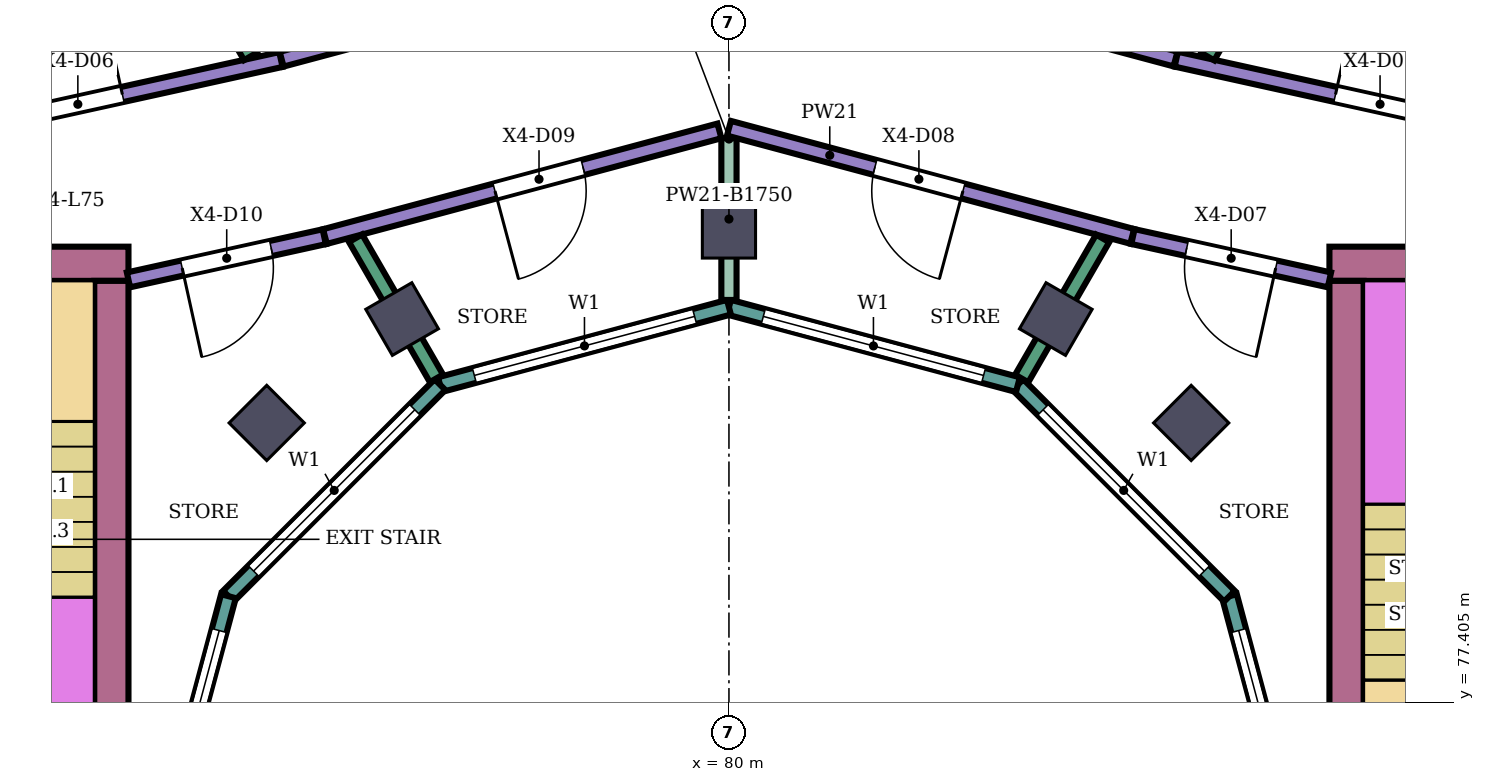
"""IFC4 building model, lengths in metres.
Left out: names, types, materials, properties, quantities, classifications, styles, units other than length and angle.
Written with IfcOpenShell. Run it as: python <this file> out.ifc"""

import sys

from ifc_helpers import new_model, si_unit, direction, frame, frame_2d, origin, origin_2d, place, context, subcontext, project, spatial, rectangle, extrude, element, fill, save


model = new_model("IFC4")
c1 = context("Model", 3, precision=1e-05, world=origin(), true_north=direction((0.0, 1.0)))
c2 = subcontext(c1, "Body", "Model", "MODEL_VIEW")
j1 = project(units=[si_unit("LENGTHUNIT", "METRE"), si_unit("PLANEANGLEUNIT", "RADIAN")], contexts=[c1])
p1 = place(None, origin())
s1 = spatial("IfcSite", under=j1, at=p1, CompositionType="ELEMENT")
p2 = place(p1, origin())
s2 = spatial("IfcBuilding", under=s1, at=p2, CompositionType="ELEMENT")
p3 = place(p2, frame((0.0, 0.0, 328.1)))
s3 = spatial("IfcBuildingStorey", under=s2, at=p3, CompositionType="ELEMENT", Elevation=328.1)
for number, where, z_axis, x_axis in (
    (1, (86.081, 81.081, 0.0), (0.0, 0.0, 1.0), (0.707, 0.707, 0.0)),
    (2, (84.3, 82.448, 0.0), (0.0, 0.0, 1.0), (0.5, 0.866, 0.0)),
    (3, (80.0, 83.6, 0.0), (0.0, 0.0, 1.0), (0.0, 1.0, 0.0)),
    (4, (75.7, 82.448, 0.0), (0.0, 0.0, 1.0), (-0.5, 0.866, 0.0)),
    (5, (73.919, 81.081, 0.0), (0.0, 0.0, 1.0), (-0.707, 0.707, 0.0)),
):
    element("IfcColumn", number, at=place(p3, frame(where, z_axis=z_axis, x_axis=x_axis)), inside=s3, PredefinedType="COLUMN", context=c2, shape_type="SweptSolid", body=[
        extrude(rectangle(XDim=0.7, YDim=0.7, at=origin_2d()), origin(), (0.0, 0.0, 1.0), 5.0),
    ])
p4 = place(p3, frame((87.9, 83.175, 0.0), z_axis=(0.0, 0.0, 1.0), x_axis=(1.0, 0.0, 0.0)))
e6 = element("IfcWall", 6, at=p4, inside=s3, PredefinedType="SHEAR", context=c2, shape_type="SweptSolid", body=[
    extrude(rectangle(XDim=7.05, YDim=0.45, at=frame_2d((3.525, 0.0))), origin(), (0.0, 0.0, 1.0), 4.65),
])
p5 = place(p4, frame((4.2, 0.0, 0.0)))
e7 = element("IfcOpeningElement", 7, at=p5, cuts=e6, PredefinedType="OPENING", context=c2, shape_type="SweptSolid", body=[
    extrude(rectangle(XDim=2.4, YDim=2.4, at=frame_2d((1.2, 1.2))), frame((0.0, 0.235, 0.0), z_axis=(0.0, -1.0, 0.0), x_axis=(1.0, 0.0, 0.0)), (0.0, 0.0, 1.0), 0.47),
])
p6 = place(p3, frame((88.125, 75.0, 0.0), z_axis=(0.0, 0.0, 1.0), x_axis=(0.0, 1.0, 0.0)))
e8 = element("IfcWall", 8, at=p6, inside=s3, PredefinedType="SHEAR", context=c2, shape_type="SweptSolid", body=[
    extrude(rectangle(XDim=7.95, YDim=0.45, at=frame_2d((3.975, 0.0))), origin(), (0.0, 0.0, 1.0), 4.65),
])
p7 = place(p3, frame((72.1, 83.175, 0.0), z_axis=(0.0, 0.0, 1.0), x_axis=(-1.0, 0.0, 0.0)))
e9 = element("IfcWall", 9, at=p7, inside=s3, PredefinedType="SHEAR", context=c2, shape_type="SweptSolid", body=[
    extrude(rectangle(XDim=7.05, YDim=0.45, at=frame_2d((3.525, 0.0))), origin(), (0.0, 0.0, 1.0), 4.65),
])
p8 = place(p7, frame((4.2, 0.0, 0.0)))
e10 = element("IfcOpeningElement", 10, at=p8, cuts=e9, PredefinedType="OPENING", context=c2, shape_type="SweptSolid", body=[
    extrude(rectangle(XDim=2.4, YDim=2.4, at=frame_2d((1.2, 1.2))), frame((0.0, 0.235, 0.0), z_axis=(0.0, -1.0, 0.0), x_axis=(1.0, 0.0, 0.0)), (0.0, 0.0, 1.0), 0.47),
])
p9 = place(p3, frame((71.875, 82.95, 0.0), z_axis=(0.0, 0.0, 1.0), x_axis=(0.0, -1.0, 0.0)))
e11 = element("IfcWall", 11, at=p9, inside=s3, PredefinedType="SHEAR", context=c2, shape_type="SweptSolid", body=[
    extrude(rectangle(XDim=7.95, YDim=0.45, at=frame_2d((3.975, 0.0))), origin(), (0.0, 0.0, 1.0), 4.65),
])
p10 = place(p3, frame((87.604, 75.0, 0.0), z_axis=(0.0, 0.0, 1.0), x_axis=(-0.258789828301, 0.965933654434, 0.0)))
e12 = element("IfcWall", 12, at=p10, inside=s3, PredefinedType="NOTDEFINED", context=c2, shape_type="SweptSolid", body=[
    extrude(rectangle(XDim=3.936, YDim=0.2, at=frame_2d((1.968, 0.0))), origin(), (0.0, 0.0, 1.0), 5.0),
])
p11 = place(p10, frame((0.468, 0.0, 0.9)))
e13 = element("IfcOpeningElement", 13, at=p11, cuts=e12, PredefinedType="OPENING", context=c2, shape_type="SweptSolid", body=[
    extrude(rectangle(XDim=3.0, YDim=2.3, at=frame_2d((1.5, 1.15))), frame((0.0, 0.11, 0.0), z_axis=(0.0, -1.0, 0.0), x_axis=(1.0, 0.0, 0.0)), (0.0, 0.0, 1.0), 0.22),
])
p12 = place(p3, frame((86.585, 78.802, 0.0), z_axis=(0.0, 0.0, 1.0), x_axis=(-0.707106781187, 0.707106781187, 0.0)))
e14 = element("IfcWall", 14, at=p12, inside=s3, PredefinedType="NOTDEFINED", context=c2, shape_type="SweptSolid", body=[
    extrude(rectangle(XDim=3.936, YDim=0.2, at=frame_2d((1.968, 0.0))), origin(), (0.0, 0.0, 1.0), 5.0),
])
p13 = place(p12, frame((0.468, 0.0, 0.9)))
e15 = element("IfcOpeningElement", 15, at=p13, cuts=e14, PredefinedType="OPENING", context=c2, shape_type="SweptSolid", body=[
    extrude(rectangle(XDim=3.0, YDim=2.3, at=frame_2d((1.5, 1.15))), frame((0.0, 0.11, 0.0), z_axis=(0.0, -1.0, 0.0), x_axis=(1.0, 0.0, 0.0)), (0.0, 0.0, 1.0), 0.22),
])
p14 = place(p3, frame((83.802, 81.585, 0.0), z_axis=(0.0, 0.0, 1.0), x_axis=(-0.965933654434, 0.258789828301, 0.0)))
e16 = element("IfcWall", 16, at=p14, inside=s3, PredefinedType="NOTDEFINED", context=c2, shape_type="SweptSolid", body=[
    extrude(rectangle(XDim=3.936, YDim=0.2, at=frame_2d((1.968, 0.0))), origin(), (0.0, 0.0, 1.0), 5.0),
])
p15 = place(p14, frame((0.468, 0.0, 0.9)))
e17 = element("IfcOpeningElement", 17, at=p15, cuts=e16, PredefinedType="OPENING", context=c2, shape_type="SweptSolid", body=[
    extrude(rectangle(XDim=3.0, YDim=2.3, at=frame_2d((1.5, 1.15))), frame((0.0, 0.11, 0.0), z_axis=(0.0, -1.0, 0.0), x_axis=(1.0, 0.0, 0.0)), (0.0, 0.0, 1.0), 0.22),
])
p16 = place(p3, frame((80.0, 82.604, 0.0), z_axis=(0.0, 0.0, 1.0), x_axis=(-0.965933654434, -0.258789828301, 0.0)))
e18 = element("IfcWall", 18, at=p16, inside=s3, PredefinedType="NOTDEFINED", context=c2, shape_type="SweptSolid", body=[
    extrude(rectangle(XDim=3.936, YDim=0.2, at=frame_2d((1.968, 0.0))), origin(), (0.0, 0.0, 1.0), 5.0),
])
p17 = place(p16, frame((0.468, 0.0, 0.9)))
e19 = element("IfcOpeningElement", 19, at=p17, cuts=e18, PredefinedType="OPENING", context=c2, shape_type="SweptSolid", body=[
    extrude(rectangle(XDim=3.0, YDim=2.3, at=frame_2d((1.5, 1.15))), frame((0.0, 0.11, 0.0), z_axis=(0.0, -1.0, 0.0), x_axis=(1.0, 0.0, 0.0)), (0.0, 0.0, 1.0), 0.22),
])
p18 = place(p3, frame((76.198, 81.585, 0.0), z_axis=(0.0, 0.0, 1.0), x_axis=(-0.707106781187, -0.707106781187, 0.0)))
e20 = element("IfcWall", 20, at=p18, inside=s3, PredefinedType="NOTDEFINED", context=c2, shape_type="SweptSolid", body=[
    extrude(rectangle(XDim=3.936, YDim=0.2, at=frame_2d((1.968, 0.0))), origin(), (0.0, 0.0, 1.0), 5.0),
])
p19 = place(p18, frame((0.468, 0.0, 0.9)))
e21 = element("IfcOpeningElement", 21, at=p19, cuts=e20, PredefinedType="OPENING", context=c2, shape_type="SweptSolid", body=[
    extrude(rectangle(XDim=3.0, YDim=2.3, at=frame_2d((1.5, 1.15))), frame((0.0, 0.11, 0.0), z_axis=(0.0, -1.0, 0.0), x_axis=(1.0, 0.0, 0.0)), (0.0, 0.0, 1.0), 0.22),
])
p20 = place(p3, frame((73.415, 78.802, 0.0), z_axis=(0.0, 0.0, 1.0), x_axis=(-0.258789828301, -0.965933654434, 0.0)))
e22 = element("IfcWall", 22, at=p20, inside=s3, PredefinedType="NOTDEFINED", context=c2, shape_type="SweptSolid", body=[
    extrude(rectangle(XDim=3.936, YDim=0.2, at=frame_2d((1.968, 0.0))), origin(), (0.0, 0.0, 1.0), 5.0),
])
p21 = place(p20, frame((0.468, 0.0, 0.9)))
e23 = element("IfcOpeningElement", 23, at=p21, cuts=e22, PredefinedType="OPENING", context=c2, shape_type="SweptSolid", body=[
    extrude(rectangle(XDim=3.0, YDim=2.3, at=frame_2d((1.5, 1.15))), frame((0.0, 0.11, 0.0), z_axis=(0.0, -1.0, 0.0), x_axis=(1.0, 0.0, 0.0)), (0.0, 0.0, 1.0), 0.22),
])
p22 = place(p3, frame((68.201, 84.561, 0.0), z_axis=(0.0, 0.0, 1.0), x_axis=(0.976586307919, 0.215125970504, 0.0)))
e24 = element("IfcWall", 24, at=p22, inside=s3, PredefinedType="PARTITIONING", context=c2, shape_type="SweptSolid", body=[
    extrude(rectangle(XDim=6.047, YDim=0.2, at=frame_2d((3.023, 0.0))), origin(), (0.0, 0.0, 1.0), 4.55),
])
p23 = place(p22, frame((2.711, 0.0, 0.0)))
e25 = element("IfcOpeningElement", 25, at=p23, cuts=e24, PredefinedType="OPENING", context=c2, shape_type="SweptSolid", body=[
    extrude(rectangle(XDim=1.2, YDim=2.4, at=frame_2d((0.6, 1.2))), frame((0.0, 0.11, 0.0), z_axis=(0.0, -1.0, 0.0), x_axis=(1.0, 0.0, 0.0)), (0.0, 0.0, 1.0), 0.22),
])
p24 = place(p3, frame((71.104, 90.414, 0.0), z_axis=(0.0, 0.0, 1.0), x_axis=(0.499845568227, -0.866114546653, 0.0)))
e26 = element("IfcWall", 26, at=p24, inside=s3, PredefinedType="PARTITIONING", context=c2, shape_type="SweptSolid", body=[
    extrude(rectangle(XDim=5.207, YDim=0.2, at=frame_2d((2.604, 0.0))), origin(), (0.0, 0.0, 1.0), 3.05),
])
p25 = place(p3, frame((72.1, 82.963, 0.0), z_axis=(0.0, 0.0, 1.0), x_axis=(0.976538663429, 0.215342143642, 0.0)))
e27 = element("IfcWall", 27, at=p25, inside=s3, PredefinedType="PARTITIONING", context=c2, shape_type="SweptSolid", body=[
    extrude(rectangle(XDim=2.637, YDim=0.2, at=frame_2d((1.318, 0.0))), origin(), (0.0, 0.0, 1.0), 4.55),
])
p26 = place(p25, frame((0.723, 0.0, 0.0)))
e28 = element("IfcOpeningElement", 28, at=p26, cuts=e27, PredefinedType="OPENING", context=c2, shape_type="SweptSolid", body=[
    extrude(rectangle(XDim=1.2, YDim=2.4, at=frame_2d((0.6, 1.2))), frame((0.0, 0.11, 0.0), z_axis=(0.0, -1.0, 0.0), x_axis=(1.0, 0.0, 0.0)), (0.0, 0.0, 1.0), 0.22),
])
p27 = place(p3, frame((74.115, 85.866, 0.0), z_axis=(0.0, 0.0, 1.0), x_axis=(0.965971827496, 0.258647305194, 0.0)))
e29 = element("IfcWall", 29, at=p27, inside=s3, PredefinedType="PARTITIONING", context=c2, shape_type="SweptSolid", body=[
    extrude(rectangle(XDim=6.002, YDim=0.2, at=frame_2d((3.001, 0.0))), origin(), (0.0, 0.0, 1.0), 4.55),
])
p28 = place(p27, frame((3.872, 0.0, 0.0)))
e30 = element("IfcOpeningElement", 30, at=p28, cuts=e29, PredefinedType="OPENING", context=c2, shape_type="SweptSolid", body=[
    extrude(rectangle(XDim=1.2, YDim=2.4, at=frame_2d((0.6, 1.2))), frame((0.0, 0.11, 0.0), z_axis=(0.0, -1.0, 0.0), x_axis=(1.0, 0.0, 0.0)), (0.0, 0.0, 1.0), 0.22),
])
p29 = place(p27, frame((0.846, 0.0, 0.0)))
e31 = element("IfcOpeningElement", 31, at=p29, cuts=e29, PredefinedType="OPENING", context=c2, shape_type="SweptSolid", body=[
    extrude(rectangle(XDim=1.2, YDim=2.4, at=frame_2d((0.6, 1.2))), frame((0.0, 0.11, 0.0), z_axis=(0.0, -1.0, 0.0), x_axis=(1.0, 0.0, 0.0)), (0.0, 0.0, 1.0), 0.22),
])
p30 = place(p3, frame((74.685, 83.533, 0.0), z_axis=(0.0, 0.0, 1.0), x_axis=(0.965946226255, 0.258742899388, 0.0)))
e32 = element("IfcWall", 32, at=p30, inside=s3, PredefinedType="PARTITIONING", context=c2, shape_type="SweptSolid", body=[
    extrude(rectangle(XDim=5.373, YDim=0.2, at=frame_2d((2.686, 0.0))), origin(), (0.0, 0.0, 1.0), 4.55),
])
p31 = place(p30, frame((2.315, 0.0, 0.0)))
e33 = element("IfcOpeningElement", 33, at=p31, cuts=e32, PredefinedType="OPENING", context=c2, shape_type="SweptSolid", body=[
    extrude(rectangle(XDim=1.2, YDim=2.4, at=frame_2d((0.6, 1.2))), frame((0.0, 0.11, 0.0), z_axis=(0.0, -1.0, 0.0), x_axis=(1.0, 0.0, 0.0)), (0.0, 0.0, 1.0), 0.22),
])
p32 = place(p3, frame((75.088, 83.511, 0.0), z_axis=(0.0, 0.0, 1.0), x_axis=(0.499851500703, -0.86611112292, 0.0)))
e34 = element("IfcWall", 34, at=p32, inside=s3, PredefinedType="PARTITIONING", context=c2, shape_type="SweptSolid", body=[
    extrude(rectangle(XDim=2.129, YDim=0.2, at=frame_2d((1.064, 0.0))), origin(), (0.0, 0.0, 1.0), 3.05),
])
p33 = place(p3, frame((80.0, 82.699, 0.0), z_axis=(0.0, 0.0, 1.0), x_axis=(0.0, 1.0, 0.0)))
e35 = element("IfcWall", 35, at=p33, inside=s3, PredefinedType="PARTITIONING", context=c2, shape_type="SweptSolid", body=[
    extrude(rectangle(XDim=2.129, YDim=0.2, at=frame_2d((1.064, 0.0))), origin(), (0.0, 0.0, 1.0), 3.25),
])
p34 = place(p3, frame((80.0, 84.958, 0.0), z_axis=(0.0, 0.0, 1.0), x_axis=(0.96587918454, -0.258993051784, 0.0)))
e36 = element("IfcWall", 36, at=p34, inside=s3, PredefinedType="PARTITIONING", context=c2, shape_type="SweptSolid", body=[
    extrude(rectangle(XDim=5.493, YDim=0.2, at=frame_2d((2.747, 0.0))), origin(), (0.0, 0.0, 1.0), 4.55),
])
p35 = place(p34, frame((1.987, 0.0, 0.0)))
e37 = element("IfcOpeningElement", 37, at=p35, cuts=e36, PredefinedType="OPENING", context=c2, shape_type="SweptSolid", body=[
    extrude(rectangle(XDim=1.2, YDim=2.4, at=frame_2d((0.6, 1.2))), frame((0.0, 0.11, 0.0), z_axis=(0.0, -1.0, 0.0), x_axis=(1.0, 0.0, 0.0)), (0.0, 0.0, 1.0), 0.22),
])
p36 = place(p3, frame((80.0, 87.442, 0.0), z_axis=(0.0, 0.0, 1.0), x_axis=(0.965947872364, -0.25873675401, 0.0)))
e38 = element("IfcWall", 38, at=p36, inside=s3, PredefinedType="PARTITIONING", context=c2, shape_type="SweptSolid", body=[
    extrude(rectangle(XDim=6.082, YDim=0.2, at=frame_2d((3.041, 0.0))), origin(), (0.0, 0.0, 1.0), 4.55),
])
p37 = place(p36, frame((4.047, 0.0, 0.0)))
e39 = element("IfcOpeningElement", 39, at=p37, cuts=e38, PredefinedType="OPENING", context=c2, shape_type="SweptSolid", body=[
    extrude(rectangle(XDim=1.2, YDim=2.4, at=frame_2d((0.6, 1.2))), frame((0.0, 0.11, 0.0), z_axis=(0.0, -1.0, 0.0), x_axis=(1.0, 0.0, 0.0)), (0.0, 0.0, 1.0), 0.22),
])
p38 = place(p36, frame((1.02, 0.0, 0.0)))
e40 = element("IfcOpeningElement", 40, at=p38, cuts=e38, PredefinedType="OPENING", context=c2, shape_type="SweptSolid", body=[
    extrude(rectangle(XDim=1.2, YDim=2.4, at=frame_2d((0.6, 1.2))), frame((0.0, 0.11, 0.0), z_axis=(0.0, -1.0, 0.0), x_axis=(1.0, 0.0, 0.0)), (0.0, 0.0, 1.0), 0.22),
])
p39 = place(p3, frame((83.852, 81.666, 0.0), z_axis=(0.0, 0.0, 1.0), x_axis=(0.500208817256, 0.865904809514, 0.0)))
e41 = element("IfcWall", 41, at=p39, inside=s3, PredefinedType="PARTITIONING", context=c2, shape_type="SweptSolid", body=[
    extrude(rectangle(XDim=2.129, YDim=0.2, at=frame_2d((1.064, 0.0))), origin(), (0.0, 0.0, 1.0), 3.05),
])
p40 = place(p3, frame((85.315, 83.533, 0.0), z_axis=(0.0, 0.0, 1.0), x_axis=(0.97653518439, -0.215357919867, 0.0)))
e42 = element("IfcWall", 42, at=p40, inside=s3, PredefinedType="PARTITIONING", context=c2, shape_type="SweptSolid", body=[
    extrude(rectangle(XDim=2.647, YDim=0.2, at=frame_2d((1.323, 0.0))), origin(), (0.0, 0.0, 1.0), 4.55),
])
p41 = place(p40, frame((0.723, 0.0, 0.0)))
e43 = element("IfcOpeningElement", 43, at=p41, cuts=e42, PredefinedType="OPENING", context=c2, shape_type="SweptSolid", body=[
    extrude(rectangle(XDim=1.2, YDim=2.4, at=frame_2d((0.6, 1.2))), frame((0.0, 0.11, 0.0), z_axis=(0.0, -1.0, 0.0), x_axis=(1.0, 0.0, 0.0)), (0.0, 0.0, 1.0), 0.22),
])
p42 = place(p3, frame((85.885, 85.866, 0.0), z_axis=(0.0, 0.0, 1.0), x_axis=(0.976458510835, -0.215705300395, 0.0)))
e44 = element("IfcWall", 44, at=p42, inside=s3, PredefinedType="PARTITIONING", context=c2, shape_type="SweptSolid", body=[
    extrude(rectangle(XDim=6.056, YDim=0.2, at=frame_2d((3.028, 0.0))), origin(), (0.0, 0.0, 1.0), 4.55),
])
p43 = place(p42, frame((2.146, 0.0, 0.0)))
e45 = element("IfcOpeningElement", 45, at=p43, cuts=e44, PredefinedType="OPENING", context=c2, shape_type="SweptSolid", body=[
    extrude(rectangle(XDim=1.2, YDim=2.4, at=frame_2d((0.6, 1.2))), frame((0.0, 0.11, 0.0), z_axis=(0.0, -1.0, 0.0), x_axis=(1.0, 0.0, 0.0)), (0.0, 0.0, 1.0), 0.22),
])
p44 = place(p3, frame((86.298, 85.901, 0.0), z_axis=(0.0, 0.0, 1.0), x_axis=(0.500243229232, 0.865884929773, 0.0)))
e46 = element("IfcWall", 46, at=p44, inside=s3, PredefinedType="PARTITIONING", context=c2, shape_type="SweptSolid", body=[
    extrude(rectangle(XDim=5.208, YDim=0.2, at=frame_2d((2.604, 0.0))), origin(), (0.0, 0.0, 1.0), 3.05),
])
p45 = place(p11, origin())
e47 = element("IfcWindow", 47, at=p45, inside=s3, PartitioningType="SINGLE_PANEL", PredefinedType="WINDOW", context=c2, shape_type="SweptSolid", body=[
    extrude(rectangle(XDim=3.0, YDim=2.3, at=frame_2d((1.5, 1.15))), frame((0.0, 0.03, 0.0), z_axis=(0.0, -1.0, 0.0), x_axis=(1.0, 0.0, 0.0)), (0.0, 0.0, 1.0), 0.06),
])
fill(e13, e47)
p46 = place(p13, origin())
e48 = element("IfcWindow", 48, at=p46, inside=s3, PartitioningType="SINGLE_PANEL", PredefinedType="WINDOW", context=c2, shape_type="SweptSolid", body=[
    extrude(rectangle(XDim=3.0, YDim=2.3, at=frame_2d((1.5, 1.15))), frame((0.0, 0.03, 0.0), z_axis=(0.0, -1.0, 0.0), x_axis=(1.0, 0.0, 0.0)), (0.0, 0.0, 1.0), 0.06),
])
fill(e15, e48)
p47 = place(p15, origin())
e49 = element("IfcWindow", 49, at=p47, inside=s3, PartitioningType="SINGLE_PANEL", PredefinedType="WINDOW", context=c2, shape_type="SweptSolid", body=[
    extrude(rectangle(XDim=3.0, YDim=2.3, at=frame_2d((1.5, 1.15))), frame((0.0, 0.03, 0.0), z_axis=(0.0, -1.0, 0.0), x_axis=(1.0, 0.0, 0.0)), (0.0, 0.0, 1.0), 0.06),
])
fill(e17, e49)
p48 = place(p17, origin())
e50 = element("IfcWindow", 50, at=p48, inside=s3, PartitioningType="SINGLE_PANEL", PredefinedType="WINDOW", context=c2, shape_type="SweptSolid", body=[
    extrude(rectangle(XDim=3.0, YDim=2.3, at=frame_2d((1.5, 1.15))), frame((0.0, 0.03, 0.0), z_axis=(0.0, -1.0, 0.0), x_axis=(1.0, 0.0, 0.0)), (0.0, 0.0, 1.0), 0.06),
])
fill(e19, e50)
p49 = place(p19, origin())
e51 = element("IfcWindow", 51, at=p49, inside=s3, PartitioningType="SINGLE_PANEL", PredefinedType="WINDOW", context=c2, shape_type="SweptSolid", body=[
    extrude(rectangle(XDim=3.0, YDim=2.3, at=frame_2d((1.5, 1.15))), frame((0.0, 0.03, 0.0), z_axis=(0.0, -1.0, 0.0), x_axis=(1.0, 0.0, 0.0)), (0.0, 0.0, 1.0), 0.06),
])
fill(e21, e51)
p50 = place(p21, origin())
e52 = element("IfcWindow", 52, at=p50, inside=s3, PartitioningType="SINGLE_PANEL", PredefinedType="WINDOW", context=c2, shape_type="SweptSolid", body=[
    extrude(rectangle(XDim=3.0, YDim=2.3, at=frame_2d((1.5, 1.15))), frame((0.0, 0.03, 0.0), z_axis=(0.0, -1.0, 0.0), x_axis=(1.0, 0.0, 0.0)), (0.0, 0.0, 1.0), 0.06),
])
fill(e23, e52)
p51 = place(p43, origin())
e53 = element("IfcDoor", 53, at=p51, inside=s3, OperationType="SINGLE_SWING_LEFT", PredefinedType="DOOR", context=c2, shape_type="SweptSolid", body=[
    extrude(rectangle(XDim=1.2, YDim=2.4, at=frame_2d((0.6, 1.2))), frame((0.0, 0.025, 0.0), z_axis=(0.0, -1.0, 0.0), x_axis=(1.0, 0.0, 0.0)), (0.0, 0.0, 1.0), 0.05),
])
fill(e45, e53)
p52 = place(p23, origin())
e54 = element("IfcDoor", 54, at=p52, inside=s3, OperationType="SINGLE_SWING_RIGHT", PredefinedType="DOOR", context=c2, shape_type="SweptSolid", body=[
    extrude(rectangle(XDim=1.2, YDim=2.4, at=frame_2d((0.6, 1.2))), frame((0.0, 0.025, 0.0), z_axis=(0.0, -1.0, 0.0), x_axis=(1.0, 0.0, 0.0)), (0.0, 0.0, 1.0), 0.05),
])
fill(e25, e54)
p53 = place(p41, frame((1.2, 0.0, 0.0), z_axis=(0.0, 0.0, 1.0), x_axis=(-1.0, 0.0, 0.0)))
e55 = element("IfcDoor", 55, at=p53, inside=s3, OperationType="SINGLE_SWING_LEFT", PredefinedType="DOOR", context=c2, shape_type="SweptSolid", body=[
    extrude(rectangle(XDim=1.2, YDim=2.4, at=frame_2d((0.6, 1.2))), frame((0.0, 0.025, 0.0), z_axis=(0.0, -1.0, 0.0), x_axis=(1.0, 0.0, 0.0)), (0.0, 0.0, 1.0), 0.05),
])
fill(e43, e55)
p54 = place(p35, frame((1.2, 0.0, 0.0), z_axis=(0.0, 0.0, 1.0), x_axis=(-1.0, 0.0, 0.0)))
e56 = element("IfcDoor", 56, at=p54, inside=s3, OperationType="SINGLE_SWING_LEFT", PredefinedType="DOOR", context=c2, shape_type="SweptSolid", body=[
    extrude(rectangle(XDim=1.2, YDim=2.4, at=frame_2d((0.6, 1.2))), frame((0.0, 0.025, 0.0), z_axis=(0.0, -1.0, 0.0), x_axis=(1.0, 0.0, 0.0)), (0.0, 0.0, 1.0), 0.05),
])
fill(e37, e56)
p55 = place(p31, frame((1.2, 0.0, 0.0), z_axis=(0.0, 0.0, 1.0), x_axis=(-1.0, 0.0, 0.0)))
e57 = element("IfcDoor", 57, at=p55, inside=s3, OperationType="SINGLE_SWING_RIGHT", PredefinedType="DOOR", context=c2, shape_type="SweptSolid", body=[
    extrude(rectangle(XDim=1.2, YDim=2.4, at=frame_2d((0.6, 1.2))), frame((0.0, 0.025, 0.0), z_axis=(0.0, -1.0, 0.0), x_axis=(1.0, 0.0, 0.0)), (0.0, 0.0, 1.0), 0.05),
])
fill(e33, e57)
p56 = place(p26, frame((1.2, 0.0, 0.0), z_axis=(0.0, 0.0, 1.0), x_axis=(-1.0, 0.0, 0.0)))
e58 = element("IfcDoor", 58, at=p56, inside=s3, OperationType="SINGLE_SWING_RIGHT", PredefinedType="DOOR", context=c2, shape_type="SweptSolid", body=[
    extrude(rectangle(XDim=1.2, YDim=2.4, at=frame_2d((0.6, 1.2))), frame((0.0, 0.025, 0.0), z_axis=(0.0, -1.0, 0.0), x_axis=(1.0, 0.0, 0.0)), (0.0, 0.0, 1.0), 0.05),
])
fill(e28, e58)
save(model, sys.argv[1])
